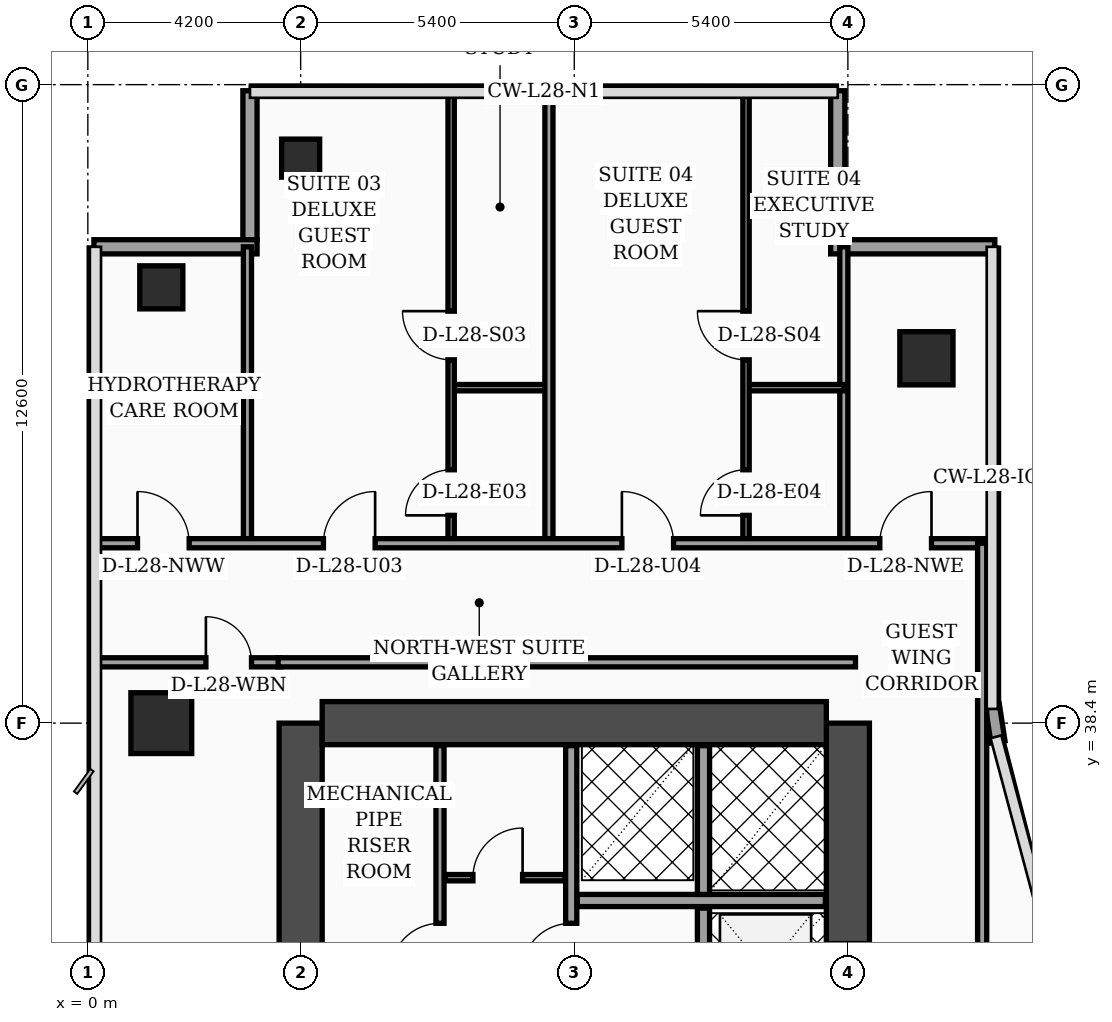
"""IFC4 building model, lengths in metres.
Left out: names, types, materials, properties, quantities, classifications, styles, units other than length and angle.
Written with IfcOpenShell. Run it as: python <this file> out.ifc"""

import sys

from ifc_helpers import new_model, si_unit, direction, frame, frame_2d, origin, origin_2d, place, context, subcontext, project, spatial, rectangle, hollow_rectangle, extrude, element, fill, save


model = new_model("IFC4")
c1 = context("Model", 3, precision=1e-05, world=origin(), true_north=direction((0.0, 1.0)))
c2 = subcontext(c1, "Body", "Model", "MODEL_VIEW")
j1 = project(units=[si_unit("LENGTHUNIT", "METRE"), si_unit("PLANEANGLEUNIT", "RADIAN")], contexts=[c1])
p1 = place(None, origin())
s1 = spatial("IfcSite", under=j1, at=p1, CompositionType="ELEMENT")
p2 = place(p1, origin())
s2 = spatial("IfcBuilding", under=s1, at=p2, CompositionType="ELEMENT")
p3 = place(p2, frame((0.0, 0.0, 116.4)))
s3 = spatial("IfcBuildingStorey", under=s2, at=p3, CompositionType="ELEMENT", Elevation=116.4)
p4 = place(p3, frame((4.2, 16.8, 0.0), z_axis=(0.0, 0.0, 1.0), x_axis=(0.0, 1.0, 0.0)))
e1 = element("IfcWall", 1, at=p4, inside=s3, PredefinedType="SHEAR", context=c2, shape_type="SweptSolid", body=[
    extrude(rectangle(XDim=21.6, YDim=0.85, at=frame_2d((10.8, 0.0))), origin(), (0.0, 0.0, 1.0), 3.56),
])
p5 = place(p3, frame((15.0, 16.8, 0.0), z_axis=(0.0, 0.0, 1.0), x_axis=(0.0, 1.0, 0.0)))
e2 = element("IfcWall", 2, at=p5, inside=s3, PredefinedType="SHEAR", context=c2, shape_type="SweptSolid", body=[
    extrude(rectangle(XDim=21.6, YDim=0.85, at=frame_2d((10.8, 0.0))), origin(), (0.0, 0.0, 1.0), 3.56),
])
p6 = place(p5, frame((8.65, 0.0, 0.0)))
e3 = element("IfcOpeningElement", 3, at=p6, cuts=e2, PredefinedType="OPENING", context=c2, shape_type="SweptSolid", body=[
    extrude(rectangle(XDim=1.1, YDim=2.2, at=frame_2d((0.55, 1.1))), frame((0.0, 0.435, 0.0), z_axis=(0.0, -1.0, 0.0), x_axis=(1.0, 0.0, 0.0)), (0.0, 0.0, 1.0), 0.87),
])
p7 = place(p5, frame((10.85, 0.0, 0.0)))
e4 = element("IfcOpeningElement", 4, at=p7, cuts=e2, PredefinedType="OPENING", context=c2, shape_type="SweptSolid", body=[
    extrude(rectangle(XDim=1.1, YDim=2.2, at=frame_2d((0.55, 1.1))), frame((0.0, 0.435, 0.0), z_axis=(0.0, -1.0, 0.0), x_axis=(1.0, 0.0, 0.0)), (0.0, 0.0, 1.0), 0.87),
])
p8 = place(p5, frame((13.5, 0.0, 0.0)))
e5 = element("IfcOpeningElement", 5, at=p8, cuts=e2, PredefinedType="OPENING", context=c2, shape_type="SweptSolid", body=[
    extrude(rectangle(XDim=1.1, YDim=2.2, at=frame_2d((0.55, 1.1))), frame((0.0, 0.435, 0.0), z_axis=(0.0, -1.0, 0.0), x_axis=(1.0, 0.0, 0.0)), (0.0, 0.0, 1.0), 0.87),
])
p9 = place(p5, frame((16.15, 0.0, 0.0)))
e6 = element("IfcOpeningElement", 6, at=p9, cuts=e2, PredefinedType="OPENING", context=c2, shape_type="SweptSolid", body=[
    extrude(rectangle(XDim=1.1, YDim=2.2, at=frame_2d((0.55, 1.1))), frame((0.0, 0.435, 0.0), z_axis=(0.0, -1.0, 0.0), x_axis=(1.0, 0.0, 0.0)), (0.0, 0.0, 1.0), 0.87),
])
p10 = place(p3, frame((4.625, 38.4, 0.0), z_axis=(0.0, 0.0, 1.0), x_axis=(1.0, 0.0, 0.0)))
e7 = element("IfcWall", 7, at=p10, inside=s3, PredefinedType="SHEAR", context=c2, shape_type="SweptSolid", body=[
    extrude(rectangle(XDim=9.95, YDim=0.85, at=frame_2d((4.975, 0.0))), origin(), (0.0, 0.0, 1.0), 3.56),
])
p11 = place(p3, frame((1.45, 38.4, 0.0), z_axis=(0.0, 0.0, 1.0), x_axis=(1.0, 0.0, 0.0)))
e8 = element("IfcColumn", 8, at=p11, inside=s3, PredefinedType="COLUMN", context=c2, shape_type="SweptSolid", body=[
    extrude(rectangle(XDim=1.2, YDim=1.2, at=origin_2d()), origin(), (0.0, 0.0, 1.0), 3.56),
])
p12 = place(p3, frame((1.45, 47.0, 0.0), z_axis=(0.0, 0.0, 1.0), x_axis=(1.0, 0.0, 0.0)))
e9 = element("IfcColumn", 9, at=p12, inside=s3, PredefinedType="COLUMN", context=c2, shape_type="SweptSolid", body=[
    extrude(hollow_rectangle(XDim=0.85, YDim=0.85, WallThickness=0.036, at=origin_2d()), origin(), (0.0, 0.0, 1.0), 3.56),
])
p13 = place(p3, frame((4.2, 49.55, 0.0), z_axis=(0.0, 0.0, 1.0), x_axis=(1.0, 0.0, 0.0)))
e10 = element("IfcColumn", 10, at=p13, inside=s3, PredefinedType="COLUMN", context=c2, shape_type="SweptSolid", body=[
    extrude(hollow_rectangle(XDim=0.75, YDim=0.75, WallThickness=0.032, at=origin_2d()), origin(), (0.0, 0.0, 1.0), 3.56),
])
p14 = place(p3, frame((16.55, 45.6, 0.0), z_axis=(0.0, 0.0, 1.0), x_axis=(1.0, 0.0, 0.0)))
e11 = element("IfcColumn", 11, at=p14, inside=s3, PredefinedType="COLUMN", context=c2, shape_type="SweptSolid", body=[
    extrude(rectangle(XDim=1.05, YDim=1.05, at=origin_2d()), origin(), (0.0, 0.0, 1.0), 3.56),
])
p15 = place(p3, frame((17.962, 38.03, 0.0), z_axis=(0.0, 0.0, 1.0), x_axis=(-0.15141125477, 0.988470855377, 0.0)))
e12 = element("IfcWall", 12, at=p15, inside=s3, PredefinedType="SOLIDWALL", context=c2, shape_type="SweptSolid", body=[
    extrude(rectangle(XDim=0.739, YDim=0.28, at=frame_2d((0.369, 0.0))), origin(), (0.0, 0.0, 1.0), 3.56),
])
p16 = place(p3, frame((17.9, 47.8, 0.0), z_axis=(0.0, 0.0, 1.0), x_axis=(-1.0, 0.0, 0.0)))
e13 = element("IfcWall", 13, at=p16, inside=s3, PredefinedType="SOLIDWALL", context=c2, shape_type="SweptSolid", body=[
    extrude(rectangle(XDim=3.24, YDim=0.28, at=frame_2d((1.62, 0.0))), origin(), (0.0, 0.0, 1.0), 3.56),
])
p17 = place(p3, frame((14.8, 47.94, 0.0), z_axis=(0.0, 0.0, 1.0), x_axis=(0.0, 1.0, 0.0)))
e14 = element("IfcWall", 14, at=p17, inside=s3, PredefinedType="SOLIDWALL", context=c2, shape_type="SweptSolid", body=[
    extrude(rectangle(XDim=2.94, YDim=0.28, at=frame_2d((1.47, 0.0))), origin(), (0.0, 0.0, 1.0), 3.56),
])
p18 = place(p3, frame((3.2, 50.88, 0.0), z_axis=(0.0, 0.0, 1.0), x_axis=(0.0, -1.0, 0.0)))
e15 = element("IfcWall", 15, at=p18, inside=s3, PredefinedType="SOLIDWALL", context=c2, shape_type="SweptSolid", body=[
    extrude(rectangle(XDim=2.94, YDim=0.28, at=frame_2d((1.47, 0.0))), origin(), (0.0, 0.0, 1.0), 3.04),
])
p19 = place(p3, frame((3.34, 47.8, 0.0), z_axis=(0.0, 0.0, 1.0), x_axis=(-1.0, 0.0, 0.0)))
e16 = element("IfcWall", 16, at=p19, inside=s3, PredefinedType="SOLIDWALL", context=c2, shape_type="SweptSolid", body=[
    extrude(rectangle(XDim=3.22, YDim=0.28, at=frame_2d((1.61, 0.0))), origin(), (0.0, 0.0, 1.0), 3.04),
])
p20 = place(p3, frame((6.95, 32.92, 0.0), z_axis=(0.0, 0.0, 1.0), x_axis=(0.0, 1.0, 0.0)))
e17 = element("IfcWall", 17, at=p20, inside=s3, PredefinedType="PARTITIONING", context=c2, shape_type="SweptSolid", body=[
    extrude(rectangle(XDim=5.035, YDim=0.16, at=frame_2d((2.518, 0.0))), origin(), (0.0, 0.0, 1.0), 3.56),
])
p21 = place(p20, frame((0.55, 0.0, 0.0)))
e18 = element("IfcOpeningElement", 18, at=p21, cuts=e17, PredefinedType="OPENING", context=c2, shape_type="SweptSolid", body=[
    extrude(rectangle(XDim=0.98, YDim=2.15, at=frame_2d((0.49, 1.075))), frame((0.0, 0.09, 0.0), z_axis=(0.0, -1.0, 0.0), x_axis=(1.0, 0.0, 0.0)), (0.0, 0.0, 1.0), 0.18),
])
p22 = place(p3, frame((7.05, 35.35, 0.0), z_axis=(0.0, 0.0, 1.0), x_axis=(1.0, 0.0, 0.0)))
e19 = element("IfcWall", 19, at=p22, inside=s3, PredefinedType="PARTITIONING", context=c2, shape_type="SweptSolid", body=[
    extrude(rectangle(XDim=2.37, YDim=0.125, at=frame_2d((1.185, 0.0))), origin(), (0.0, 0.0, 1.0), 3.56),
])
p23 = place(p22, frame((0.55, 0.0, 0.0)))
e20 = element("IfcOpeningElement", 20, at=p23, cuts=e19, PredefinedType="OPENING", context=c2, shape_type="SweptSolid", body=[
    extrude(rectangle(XDim=0.98, YDim=2.15, at=frame_2d((0.49, 1.075))), frame((0.0, 0.073, 0.0), z_axis=(0.0, -1.0, 0.0), x_axis=(1.0, 0.0, 0.0)), (0.0, 0.0, 1.0), 0.145),
])
p24 = place(p3, frame((9.54, 32.92, 0.0), z_axis=(0.0, 0.0, 1.0), x_axis=(0.0, 1.0, 0.0)))
e21 = element("IfcWall", 21, at=p24, inside=s3, PredefinedType="SOLIDWALL", context=c2, shape_type="SweptSolid", body=[
    extrude(rectangle(XDim=5.035, YDim=0.22, at=frame_2d((2.518, 0.0))), origin(), (0.0, 0.0, 1.0), 3.56),
])
p25 = place(p24, frame((0.55, 0.0, 0.0)))
e22 = element("IfcOpeningElement", 22, at=p25, cuts=e21, PredefinedType="OPENING", context=c2, shape_type="SweptSolid", body=[
    extrude(rectangle(XDim=0.98, YDim=2.15, at=frame_2d((0.49, 1.075))), frame((0.0, 0.12, 0.0), z_axis=(0.0, -1.0, 0.0), x_axis=(1.0, 0.0, 0.0)), (0.0, 0.0, 1.0), 0.24),
])
p26 = place(p3, frame((12.15, 27.0, 0.0), z_axis=(0.0, 0.0, 1.0), x_axis=(0.0, 1.0, 0.0)))
e23 = element("IfcWall", 23, at=p26, inside=s3, PredefinedType="SOLIDWALL", context=c2, shape_type="SweptSolid", body=[
    extrude(rectangle(XDim=7.75, YDim=0.24, at=frame_2d((3.875, 0.0))), origin(), (0.0, 0.0, 1.0), 3.56),
])
p27 = place(p3, frame((9.66, 34.9, 0.0), z_axis=(0.0, 0.0, 1.0), x_axis=(1.0, 0.0, 0.0)))
e24 = element("IfcWall", 24, at=p27, inside=s3, PredefinedType="SOLIDWALL", context=c2, shape_type="SweptSolid", body=[
    extrude(rectangle(XDim=4.895, YDim=0.24, at=frame_2d((2.448, 0.0))), origin(), (0.0, 0.0, 1.0), 3.56),
])
p28 = place(p3, frame((12.15, 35.02, 0.0), z_axis=(0.0, 0.0, 1.0), x_axis=(0.0, 1.0, 0.0)))
e25 = element("IfcWall", 25, at=p28, inside=s3, PredefinedType="SOLIDWALL", context=c2, shape_type="SweptSolid", body=[
    extrude(rectangle(XDim=2.935, YDim=0.24, at=frame_2d((1.468, 0.0))), origin(), (0.0, 0.0, 1.0), 3.56),
])
p29 = place(p3, frame((0.08, 39.6, 0.0), z_axis=(0.0, 0.0, 1.0), x_axis=(1.0, 0.0, 0.0)))
e26 = element("IfcWall", 26, at=p29, inside=s3, PredefinedType="PARTITIONING", context=c2, shape_type="SweptSolid", body=[
    extrude(rectangle(XDim=3.725, YDim=0.18, at=frame_2d((1.862, 0.0))), origin(), (0.0, 0.0, 1.0), 2.84),
])
p30 = place(p29, frame((2.25, 0.0, 0.0)))
e27 = element("IfcOpeningElement", 27, at=p30, cuts=e26, PredefinedType="OPENING", context=c2, shape_type="SweptSolid", body=[
    extrude(rectangle(XDim=0.9, YDim=2.15, at=frame_2d((0.45, 1.075))), frame((0.0, 0.1, 0.0), z_axis=(0.0, -1.0, 0.0), x_axis=(1.0, 0.0, 0.0)), (0.0, 0.0, 1.0), 0.2),
])
p31 = place(p3, frame((3.15, 41.95, 0.0), z_axis=(0.0, 0.0, 1.0), x_axis=(0.0, 1.0, 0.0)))
e28 = element("IfcWall", 28, at=p31, inside=s3, PredefinedType="PARTITIONING", context=c2, shape_type="SweptSolid", body=[
    extrude(rectangle(XDim=5.85, YDim=0.16, at=frame_2d((2.925, 0.0))), origin(), (0.0, 0.0, 1.0), 3.14),
])
p32 = place(p3, frame((14.92, 41.95, 0.0), z_axis=(0.0, 0.0, 1.0), x_axis=(0.0, 1.0, 0.0)))
e29 = element("IfcWall", 29, at=p32, inside=s3, PredefinedType="PARTITIONING", context=c2, shape_type="SweptSolid", body=[
    extrude(rectangle(XDim=5.85, YDim=0.16, at=frame_2d((2.925, 0.0))), origin(), (0.0, 0.0, 1.0), 3.04),
])
p33 = place(p3, frame((7.17, 45.02, 0.0), z_axis=(0.0, 0.0, 1.0), x_axis=(1.0, 0.0, 0.0)))
e30 = element("IfcWall", 30, at=p33, inside=s3, PredefinedType="PARTITIONING", context=c2, shape_type="SweptSolid", body=[
    extrude(rectangle(XDim=1.93, YDim=0.125, at=frame_2d((0.965, 0.0))), origin(), (0.0, 0.0, 1.0), 3.56),
])
p34 = place(p3, frame((7.17, 41.95, 0.0), z_axis=(0.0, 0.0, 1.0), x_axis=(0.0, 1.0, 0.0)))
e31 = element("IfcWall", 31, at=p34, inside=s3, PredefinedType="PARTITIONING", context=c2, shape_type="SweptSolid", body=[
    extrude(rectangle(XDim=8.99, YDim=0.125, at=frame_2d((4.495, 0.0))), origin(), (0.0, 0.0, 1.0), 3.04),
])
p35 = place(p34, frame((0.55, 0.0, 0.0)))
e32 = element("IfcOpeningElement", 32, at=p35, cuts=e31, PredefinedType="OPENING", context=c2, shape_type="SweptSolid", body=[
    extrude(rectangle(XDim=0.9, YDim=2.15, at=frame_2d((0.45, 1.075))), frame((0.0, 0.073, 0.0), z_axis=(0.0, -1.0, 0.0), x_axis=(1.0, 0.0, 0.0)), (0.0, 0.0, 1.0), 0.145),
])
p36 = place(p34, frame((3.62, 0.0, 0.0)))
e33 = element("IfcOpeningElement", 33, at=p36, cuts=e31, PredefinedType="OPENING", context=c2, shape_type="SweptSolid", body=[
    extrude(rectangle(XDim=0.96, YDim=2.2, at=frame_2d((0.48, 1.1))), frame((0.0, 0.073, 0.0), z_axis=(0.0, -1.0, 0.0), x_axis=(1.0, 0.0, 0.0)), (0.0, 0.0, 1.0), 0.145),
])
p37 = place(p3, frame((12.99, 45.02, 0.0), z_axis=(0.0, 0.0, 1.0), x_axis=(1.0, 0.0, 0.0)))
e34 = element("IfcWall", 34, at=p37, inside=s3, PredefinedType="PARTITIONING", context=c2, shape_type="SweptSolid", body=[
    extrude(rectangle(XDim=1.93, YDim=0.125, at=frame_2d((0.965, 0.0))), origin(), (0.0, 0.0, 1.0), 3.56),
])
p38 = place(p3, frame((12.99, 41.95, 0.0), z_axis=(0.0, 0.0, 1.0), x_axis=(0.0, 1.0, 0.0)))
e35 = element("IfcWall", 35, at=p38, inside=s3, PredefinedType="PARTITIONING", context=c2, shape_type="SweptSolid", body=[
    extrude(rectangle(XDim=8.99, YDim=0.125, at=frame_2d((4.495, 0.0))), origin(), (0.0, 0.0, 1.0), 3.04),
])
p39 = place(p38, frame((0.55, 0.0, 0.0)))
e36 = element("IfcOpeningElement", 36, at=p39, cuts=e35, PredefinedType="OPENING", context=c2, shape_type="SweptSolid", body=[
    extrude(rectangle(XDim=0.9, YDim=2.15, at=frame_2d((0.45, 1.075))), frame((0.0, 0.073, 0.0), z_axis=(0.0, -1.0, 0.0), x_axis=(1.0, 0.0, 0.0)), (0.0, 0.0, 1.0), 0.145),
])
p40 = place(p38, frame((3.62, 0.0, 0.0)))
e37 = element("IfcOpeningElement", 37, at=p40, cuts=e35, PredefinedType="OPENING", context=c2, shape_type="SweptSolid", body=[
    extrude(rectangle(XDim=0.96, YDim=2.2, at=frame_2d((0.48, 1.1))), frame((0.0, 0.073, 0.0), z_axis=(0.0, -1.0, 0.0), x_axis=(1.0, 0.0, 0.0)), (0.0, 0.0, 1.0), 0.145),
])
p41 = place(p3, frame((9.1, 41.95, 0.0), z_axis=(0.0, 0.0, 1.0), x_axis=(0.0, 1.0, 0.0)))
e38 = element("IfcWall", 38, at=p41, inside=s3, PredefinedType="PARTITIONING", context=c2, shape_type="SweptSolid", body=[
    extrude(rectangle(XDim=8.99, YDim=0.16, at=frame_2d((4.495, 0.0))), origin(), (0.0, 0.0, 1.0), 3.04),
])
p42 = place(p3, frame((0.08, 41.95, 0.0), z_axis=(0.0, 0.0, 1.0), x_axis=(1.0, 0.0, 0.0)))
e39 = element("IfcWall", 39, at=p42, inside=s3, PredefinedType="PARTITIONING", context=c2, shape_type="SweptSolid", body=[
    extrude(rectangle(XDim=17.77, YDim=0.18, at=frame_2d((8.885, 0.0))), origin(), (0.0, 0.0, 1.0), 2.84),
])
p43 = place(p42, frame((0.9, 0.0, 0.0)))
e40 = element("IfcOpeningElement", 40, at=p43, cuts=e39, PredefinedType="OPENING", context=c2, shape_type="SweptSolid", body=[
    extrude(rectangle(XDim=1.02, YDim=2.2, at=frame_2d((0.51, 1.1))), frame((0.0, 0.1, 0.0), z_axis=(0.0, -1.0, 0.0), x_axis=(1.0, 0.0, 0.0)), (0.0, 0.0, 1.0), 0.2),
])
p44 = place(p42, frame((4.57, 0.0, 0.0)))
e41 = element("IfcOpeningElement", 41, at=p44, cuts=e39, PredefinedType="OPENING", context=c2, shape_type="SweptSolid", body=[
    extrude(rectangle(XDim=1.02, YDim=2.2, at=frame_2d((0.51, 1.1))), frame((0.0, 0.1, 0.0), z_axis=(0.0, -1.0, 0.0), x_axis=(1.0, 0.0, 0.0)), (0.0, 0.0, 1.0), 0.2),
])
p45 = place(p42, frame((10.46, 0.0, 0.0)))
e42 = element("IfcOpeningElement", 42, at=p45, cuts=e39, PredefinedType="OPENING", context=c2, shape_type="SweptSolid", body=[
    extrude(rectangle(XDim=1.02, YDim=2.2, at=frame_2d((0.51, 1.1))), frame((0.0, 0.1, 0.0), z_axis=(0.0, -1.0, 0.0), x_axis=(1.0, 0.0, 0.0)), (0.0, 0.0, 1.0), 0.2),
])
p46 = place(p42, frame((15.55, 0.0, 0.0)))
e43 = element("IfcOpeningElement", 43, at=p46, cuts=e39, PredefinedType="OPENING", context=c2, shape_type="SweptSolid", body=[
    extrude(rectangle(XDim=1.02, YDim=2.2, at=frame_2d((0.51, 1.1))), frame((0.0, 0.1, 0.0), z_axis=(0.0, -1.0, 0.0), x_axis=(1.0, 0.0, 0.0)), (0.0, 0.0, 1.0), 0.2),
])
p47 = place(p3, frame((17.65, 24.3, 0.0), z_axis=(0.0, 0.0, 1.0), x_axis=(0.0, 1.0, 0.0)))
e44 = element("IfcWall", 44, at=p47, inside=s3, PredefinedType="PARTITIONING", context=c2, shape_type="SweptSolid", body=[
    extrude(rectangle(XDim=17.65, YDim=0.18, at=frame_2d((8.825, 0.0))), origin(), (0.0, 0.0, 1.0), 2.84),
])
p48 = place(p3, frame((3.755, 39.6, 0.0), z_axis=(0.0, 0.0, 1.0), x_axis=(1.0, 0.0, 0.0)))
e45 = element("IfcWall", 45, at=p48, inside=s3, PredefinedType="PARTITIONING", context=c2, shape_type="SweptSolid", body=[
    extrude(rectangle(XDim=11.395, YDim=0.18, at=frame_2d((5.698, 0.0))), origin(), (0.0, 0.0, 1.0), 2.84),
])
p49 = place(p21, origin())
e46 = element("IfcDoor", 46, at=p49, inside=s3, OperationType="SINGLE_SWING_LEFT", PredefinedType="DOOR", context=c2, shape_type="SweptSolid", body=[
    extrude(rectangle(XDim=0.98, YDim=2.15, at=frame_2d((0.49, 1.075))), frame((0.0, 0.025, 0.0), z_axis=(0.0, -1.0, 0.0), x_axis=(1.0, 0.0, 0.0)), (0.0, 0.0, 1.0), 0.05),
])
fill(e18, e46)
p50 = place(p23, origin())
e47 = element("IfcDoor", 47, at=p50, inside=s3, OperationType="SINGLE_SWING_RIGHT", PredefinedType="DOOR", context=c2, shape_type="SweptSolid", body=[
    extrude(rectangle(XDim=0.98, YDim=2.15, at=frame_2d((0.49, 1.075))), frame((0.0, 0.025, 0.0), z_axis=(0.0, -1.0, 0.0), x_axis=(1.0, 0.0, 0.0)), (0.0, 0.0, 1.0), 0.05),
])
fill(e20, e47)
p51 = place(p25, origin())
e48 = element("IfcDoor", 48, at=p51, inside=s3, OperationType="SINGLE_SWING_LEFT", PredefinedType="DOOR", context=c2, shape_type="SweptSolid", body=[
    extrude(rectangle(XDim=0.98, YDim=2.15, at=frame_2d((0.49, 1.075))), frame((0.0, 0.025, 0.0), z_axis=(0.0, -1.0, 0.0), x_axis=(1.0, 0.0, 0.0)), (0.0, 0.0, 1.0), 0.05),
])
fill(e22, e48)
p52 = place(p30, origin())
e49 = element("IfcDoor", 49, at=p52, inside=s3, OperationType="SINGLE_SWING_LEFT", PredefinedType="DOOR", context=c2, shape_type="SweptSolid", body=[
    extrude(rectangle(XDim=0.9, YDim=2.15, at=frame_2d((0.45, 1.075))), frame((0.0, 0.025, 0.0), z_axis=(0.0, -1.0, 0.0), x_axis=(1.0, 0.0, 0.0)), (0.0, 0.0, 1.0), 0.05),
])
fill(e27, e49)
p53 = place(p35, origin())
e50 = element("IfcDoor", 50, at=p53, inside=s3, OperationType="SINGLE_SWING_LEFT", PredefinedType="DOOR", context=c2, shape_type="SweptSolid", body=[
    extrude(rectangle(XDim=0.9, YDim=2.15, at=frame_2d((0.45, 1.075))), frame((0.0, 0.025, 0.0), z_axis=(0.0, -1.0, 0.0), x_axis=(1.0, 0.0, 0.0)), (0.0, 0.0, 1.0), 0.05),
])
fill(e32, e50)
p54 = place(p36, origin())
e51 = element("IfcDoor", 51, at=p54, inside=s3, OperationType="SINGLE_SWING_RIGHT", PredefinedType="DOOR", context=c2, shape_type="SweptSolid", body=[
    extrude(rectangle(XDim=0.96, YDim=2.2, at=frame_2d((0.48, 1.1))), frame((0.0, 0.025, 0.0), z_axis=(0.0, -1.0, 0.0), x_axis=(1.0, 0.0, 0.0)), (0.0, 0.0, 1.0), 0.05),
])
fill(e33, e51)
p55 = place(p39, origin())
e52 = element("IfcDoor", 52, at=p55, inside=s3, OperationType="SINGLE_SWING_LEFT", PredefinedType="DOOR", context=c2, shape_type="SweptSolid", body=[
    extrude(rectangle(XDim=0.9, YDim=2.15, at=frame_2d((0.45, 1.075))), frame((0.0, 0.025, 0.0), z_axis=(0.0, -1.0, 0.0), x_axis=(1.0, 0.0, 0.0)), (0.0, 0.0, 1.0), 0.05),
])
fill(e36, e52)
p56 = place(p40, origin())
e53 = element("IfcDoor", 53, at=p56, inside=s3, OperationType="SINGLE_SWING_RIGHT", PredefinedType="DOOR", context=c2, shape_type="SweptSolid", body=[
    extrude(rectangle(XDim=0.96, YDim=2.2, at=frame_2d((0.48, 1.1))), frame((0.0, 0.025, 0.0), z_axis=(0.0, -1.0, 0.0), x_axis=(1.0, 0.0, 0.0)), (0.0, 0.0, 1.0), 0.05),
])
fill(e37, e53)
p57 = place(p43, origin())
e54 = element("IfcDoor", 54, at=p57, inside=s3, OperationType="SINGLE_SWING_LEFT", PredefinedType="DOOR", context=c2, shape_type="SweptSolid", body=[
    extrude(rectangle(XDim=1.02, YDim=2.2, at=frame_2d((0.51, 1.1))), frame((0.0, 0.025, 0.0), z_axis=(0.0, -1.0, 0.0), x_axis=(1.0, 0.0, 0.0)), (0.0, 0.0, 1.0), 0.05),
])
fill(e40, e54)
p58 = place(p44, origin())
e55 = element("IfcDoor", 55, at=p58, inside=s3, OperationType="SINGLE_SWING_RIGHT", PredefinedType="DOOR", context=c2, shape_type="SweptSolid", body=[
    extrude(rectangle(XDim=1.02, YDim=2.2, at=frame_2d((0.51, 1.1))), frame((0.0, 0.025, 0.0), z_axis=(0.0, -1.0, 0.0), x_axis=(1.0, 0.0, 0.0)), (0.0, 0.0, 1.0), 0.05),
])
fill(e41, e55)
p59 = place(p45, origin())
e56 = element("IfcDoor", 56, at=p59, inside=s3, OperationType="SINGLE_SWING_LEFT", PredefinedType="DOOR", context=c2, shape_type="SweptSolid", body=[
    extrude(rectangle(XDim=1.02, YDim=2.2, at=frame_2d((0.51, 1.1))), frame((0.0, 0.025, 0.0), z_axis=(0.0, -1.0, 0.0), x_axis=(1.0, 0.0, 0.0)), (0.0, 0.0, 1.0), 0.05),
])
fill(e42, e56)
p60 = place(p46, origin())
e57 = element("IfcDoor", 57, at=p60, inside=s3, OperationType="SINGLE_SWING_RIGHT", PredefinedType="DOOR", context=c2, shape_type="SweptSolid", body=[
    extrude(rectangle(XDim=1.02, YDim=2.2, at=frame_2d((0.51, 1.1))), frame((0.0, 0.025, 0.0), z_axis=(0.0, -1.0, 0.0), x_axis=(1.0, 0.0, 0.0)), (0.0, 0.0, 1.0), 0.05),
])
fill(e43, e57)
save(model, sys.argv[1])
